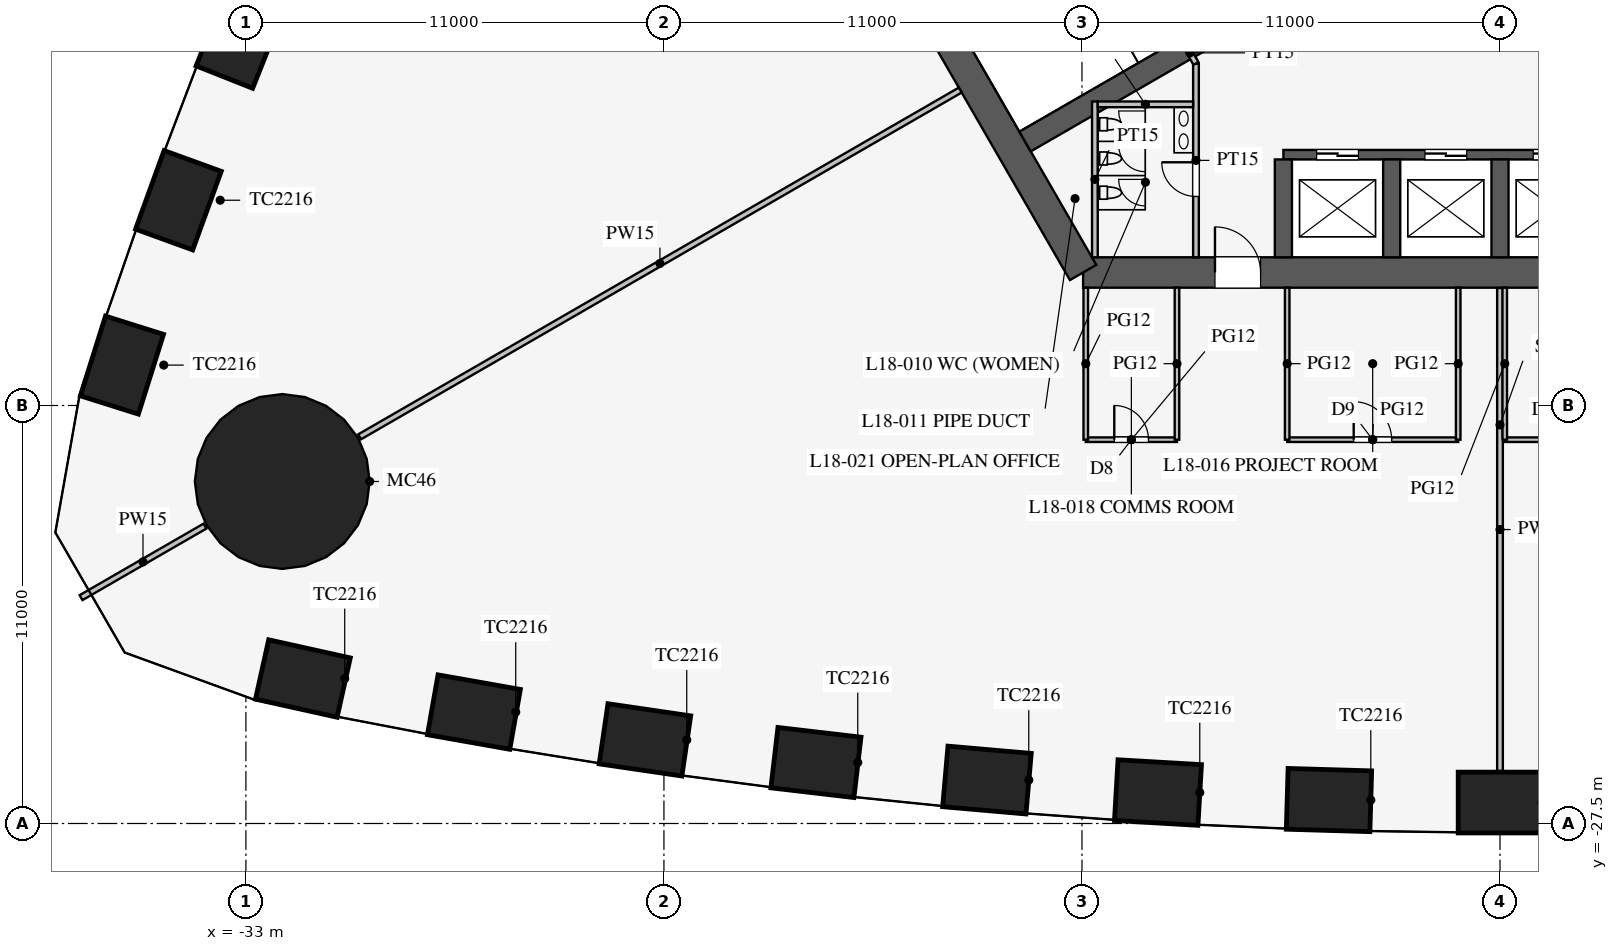
"""IFC4 building model, lengths in metres.
Left out: names, types, materials, properties, quantities, classifications, styles, units other than length and angle.
Written with IfcOpenShell. Run it as: python <this file> out.ifc"""

import sys

from ifc_helpers import new_model, si_unit, direction, frame, frame_2d, origin, origin_2d, place, context, subcontext, project, spatial, rectangle, circle, extrude, element, fill, save


model = new_model("IFC4")
c1 = context("Model", 3, precision=1e-05, world=origin(), true_north=direction((0.0, 1.0)))
c2 = subcontext(c1, "Body", "Model", "MODEL_VIEW")
j1 = project(units=[si_unit("LENGTHUNIT", "METRE"), si_unit("PLANEANGLEUNIT", "RADIAN")], contexts=[c1])
p1 = place(None, origin())
s1 = spatial("IfcSite", under=j1, at=p1, CompositionType="ELEMENT")
p2 = place(p1, origin())
s2 = spatial("IfcBuilding", under=s1, at=p2, CompositionType="ELEMENT")
p3 = place(p2, frame((0.0, 0.0, 79.5)))
s3 = spatial("IfcBuildingStorey", under=s2, at=p3, CompositionType="ELEMENT", Elevation=79.5)
for number, where, z_axis, x_axis in (
    (1, (-31.5, -23.685, 0.0), (0.0, 0.0, 1.0), (0.976, -0.217, 0.0)),
    (2, (-27.0, -24.568, 0.0), (0.0, 0.0, 1.0), (0.985, -0.174, 0.0)),
    (3, (-22.5, -25.299, 0.0), (0.0, 0.0, 1.0), (0.989, -0.145, 0.0)),
    (4, (-18.0, -25.895, 0.0), (0.0, 0.0, 1.0), (0.993, -0.116, 0.0)),
    (5, (-13.5, -26.357, 0.0), (0.0, 0.0, 1.0), (0.996, -0.087, 0.0)),
    (6, (-9.0, -26.686, 0.0), (0.0, 0.0, 1.0), (0.998, -0.058, 0.0)),
    (7, (-4.5, -26.883, 0.0), (0.0, 0.0, 1.0), (1.0, -0.029, 0.0)),
    (8, (0.0, -26.949, 0.0), (0.0, 0.0, 1.0), (1.0, 0.0, 0.0)),
    (9, (-33.16, -6.836, 0.0), (0.0, 0.0, 1.0), (-0.369, -0.929, 0.0)),
    (10, (-34.776, -11.099, 0.0), (0.0, 0.0, 1.0), (-0.342, -0.94, 0.0)),
    (11, (-36.262, -15.438, 0.0), (0.0, 0.0, 1.0), (-0.3, -0.954, 0.0)),
):
    element("IfcColumn", number, at=place(p3, frame(where, z_axis=z_axis, x_axis=x_axis)), inside=s3, PredefinedType="COLUMN", context=c2, shape_type="SweptSolid", body=[
        extrude(rectangle(XDim=2.2, YDim=1.6, at=origin_2d()), origin(), (0.0, 0.0, 1.0), 4.2),
    ])
p4 = place(p3, frame((-32.043, -18.5, 0.0), z_axis=(0.0, 0.0, 1.0), x_axis=(1.0, 0.0, 0.0)))
e12 = element("IfcColumn", 12, at=p4, inside=s3, PredefinedType="COLUMN", context=c2, shape_type="SweptSolid", body=[
    extrude(circle(Radius=2.3, at=origin_2d()), origin(), (0.0, 0.0, 1.0), 4.2),
])
p5 = place(p3, frame((-10.97, -13.0, 0.0), z_axis=(0.0, 0.0, 1.0), x_axis=(1.0, 0.0, 0.0)))
e13 = element("IfcWall", 13, at=p5, inside=s3, PredefinedType="SHEAR", context=c2, shape_type="SweptSolid", body=[
    extrude(rectangle(XDim=21.939, YDim=0.8, at=frame_2d((10.97, 0.0))), origin(), (0.0, 0.0, 1.0), 4.2),
])
p6 = place(p5, frame((17.27, 0.0, 0.0)))
e14 = element("IfcOpeningElement", 14, at=p6, cuts=e13, PredefinedType="OPENING", context=c2, shape_type="SweptSolid", body=[
    extrude(rectangle(XDim=1.2, YDim=2.1, at=frame_2d((0.6, 1.05))), frame((0.0, 0.41, 0.0), z_axis=(0.0, -1.0, 0.0), x_axis=(1.0, 0.0, 0.0)), (0.0, 0.0, 1.0), 0.82),
])
p7 = place(p5, frame((3.47, 0.0, 0.0)))
e15 = element("IfcOpeningElement", 15, at=p7, cuts=e13, PredefinedType="OPENING", context=c2, shape_type="SweptSolid", body=[
    extrude(rectangle(XDim=1.2, YDim=2.1, at=frame_2d((0.6, 1.05))), frame((0.0, 0.41, 0.0), z_axis=(0.0, -1.0, 0.0), x_axis=(1.0, 0.0, 0.0)), (0.0, 0.0, 1.0), 0.82),
])
p8 = place(p3, frame((-16.743, -3.0, 0.0), z_axis=(0.0, 0.0, 1.0), x_axis=(0.499995765644, -0.866027848477, 0.0)))
e16 = element("IfcWall", 16, at=p8, inside=s3, PredefinedType="SHEAR", context=c2, shape_type="SweptSolid", body=[
    extrude(rectangle(XDim=11.547, YDim=0.8, at=frame_2d((5.773, 0.0))), origin(), (0.0, 0.0, 1.0), 4.2),
])
p9 = place(p3, frame((-5.7, -9.9, 0.0), z_axis=(0.0, 0.0, 1.0), x_axis=(1.0, 0.0, 0.0)))
e17 = element("IfcWall", 17, at=p9, inside=s3, PredefinedType="SHEAR", context=c2, shape_type="SweptSolid", body=[
    extrude(rectangle(XDim=11.4, YDim=0.25, at=frame_2d((5.7, 0.0))), origin(), (0.0, 0.0, 1.0), 4.2),
])
p10 = place(p9, frame((0.875, 0.0, 0.0)))
e18 = element("IfcOpeningElement", 18, at=p10, cuts=e17, PredefinedType="OPENING", context=c2, shape_type="SweptSolid", body=[
    extrude(rectangle(XDim=1.1, YDim=2.2, at=frame_2d((0.55, 1.1))), frame((0.0, 0.135, 0.0), z_axis=(0.0, -1.0, 0.0), x_axis=(1.0, 0.0, 0.0)), (0.0, 0.0, 1.0), 0.27),
])
p11 = place(p9, frame((3.725, 0.0, 0.0)))
e19 = element("IfcOpeningElement", 19, at=p11, cuts=e17, PredefinedType="OPENING", context=c2, shape_type="SweptSolid", body=[
    extrude(rectangle(XDim=1.1, YDim=2.2, at=frame_2d((0.55, 1.1))), frame((0.0, 0.135, 0.0), z_axis=(0.0, -1.0, 0.0), x_axis=(1.0, 0.0, 0.0)), (0.0, 0.0, 1.0), 0.27),
])
p12 = place(p9, frame((6.575, 0.0, 0.0)))
e20 = element("IfcOpeningElement", 20, at=p12, cuts=e17, PredefinedType="OPENING", context=c2, shape_type="SweptSolid", body=[
    extrude(rectangle(XDim=1.1, YDim=2.2, at=frame_2d((0.55, 1.1))), frame((0.0, 0.135, 0.0), z_axis=(0.0, -1.0, 0.0), x_axis=(1.0, 0.0, 0.0)), (0.0, 0.0, 1.0), 0.27),
])
p13 = place(p9, frame((9.425, 0.0, 0.0)))
e21 = element("IfcOpeningElement", 21, at=p13, cuts=e17, PredefinedType="OPENING", context=c2, shape_type="SweptSolid", body=[
    extrude(rectangle(XDim=1.1, YDim=2.2, at=frame_2d((0.55, 1.1))), frame((0.0, 0.135, 0.0), z_axis=(0.0, -1.0, 0.0), x_axis=(1.0, 0.0, 0.0)), (0.0, 0.0, 1.0), 0.27),
])
for number, where, z_axis, x_axis in (
    (22, (-5.7, -10.025, 0.0), (0.0, 0.0, 1.0), (0.0, -1.0, 0.0)),
    (23, (-2.85, -10.025, 0.0), (0.0, 0.0, 1.0), (0.0, -1.0, 0.0)),
    (24, (0.0, -10.025, 0.0), (0.0, 0.0, 1.0), (0.0, -1.0, 0.0)),
):
    element("IfcWall", number, at=place(p3, frame(where, z_axis=z_axis, x_axis=x_axis)), inside=s3, PredefinedType="SHEAR", context=c2, shape_type="SweptSolid", body=[
        extrude(rectangle(XDim=2.575, YDim=0.45, at=frame_2d((1.288, 0.0))), origin(), (0.0, 0.0, 1.0), 4.2),
    ])
p14 = place(p3, frame((-4.638, -5.016, 0.0), z_axis=(0.0, 0.0, 1.0), x_axis=(-0.866019375473, -0.500010441196, 0.0)))
e25 = element("IfcWall", 25, at=p14, inside=s3, PredefinedType="SHEAR", context=c2, shape_type="SweptSolid", body=[
    extrude(rectangle(XDim=9.075, YDim=0.6, at=frame_2d((4.538, 0.0))), origin(), (0.0, 0.0, 1.0), 4.2),
])
p15 = place(p3, frame((-8.0, -7.5, 0.0), z_axis=(0.0, 0.0, 1.0), x_axis=(0.0, -1.0, 0.0)))
e26 = element("IfcWall", 26, at=p15, inside=s3, PredefinedType="PARTITIONING", context=c2, shape_type="SweptSolid", body=[
    extrude(rectangle(XDim=5.1, YDim=0.15, at=frame_2d((2.55, 0.0))), origin(), (0.0, 0.0, 1.0), 4.0),
])
p16 = place(p15, frame((2.6, 0.0, 0.0)))
e27 = element("IfcOpeningElement", 27, at=p16, cuts=e26, PredefinedType="OPENING", context=c2, shape_type="SweptSolid", body=[
    extrude(rectangle(XDim=0.9, YDim=2.1, at=frame_2d((0.45, 1.05))), frame((0.0, 0.085, 0.0), z_axis=(0.0, -1.0, 0.0), x_axis=(1.0, 0.0, 0.0)), (0.0, 0.0, 1.0), 0.17),
])
p17 = place(p3, frame((-8.0, -7.5, 0.0), z_axis=(0.0, 0.0, 1.0), x_axis=(-0.499842556608, 0.866116284689, 0.0)))
e28 = element("IfcWall", 28, at=p17, inside=s3, PredefinedType="PARTITIONING", context=c2, shape_type="SweptSolid", body=[
    extrude(rectangle(XDim=0.645, YDim=0.15, at=frame_2d((0.323, 0.0))), origin(), (0.0, 0.0, 1.0), 4.0),
])
p18 = place(p3, frame((-10.66, -8.5, 0.0), z_axis=(0.0, 0.0, 1.0), x_axis=(0.0, -1.0, 0.0)))
e29 = element("IfcWall", 29, at=p18, inside=s3, PredefinedType="PARTITIONING", context=c2, shape_type="SweptSolid", body=[
    extrude(rectangle(XDim=4.1, YDim=0.15, at=frame_2d((2.05, 0.0))), origin(), (0.0, 0.0, 1.0), 4.0),
])
p19 = place(p3, frame((-8.075, -8.575, 0.0), z_axis=(0.0, 0.0, 1.0), x_axis=(-1.0, 0.0, 0.0)))
e30 = element("IfcWall", 30, at=p19, inside=s3, PredefinedType="PARTITIONING", context=c2, shape_type="SweptSolid", body=[
    extrude(rectangle(XDim=2.51, YDim=0.15, at=frame_2d((1.255, 0.0))), origin(), (0.0, 0.0, 1.0), 4.0),
])
p20 = place(p3, frame((-14.203, -8.2, 0.0), z_axis=(0.0, 0.0, 1.0), x_axis=(-0.866024965723, -0.500000758745, 0.0)))
e31 = element("IfcWall", 31, at=p20, inside=s3, PredefinedType="PARTITIONING", context=c2, shape_type="SweptSolid", body=[
    extrude(rectangle(XDim=18.25, YDim=0.15, at=frame_2d((9.125, 0.0))), origin(), (0.0, 0.0, 1.0), 2.3),
])
p21 = place(p3, frame((-34.078, -19.675, 0.0), z_axis=(0.0, 0.0, 1.0), x_axis=(-0.866019247219, -0.500010663332, 0.0)))
e32 = element("IfcWall", 32, at=p21, inside=s3, PredefinedType="PARTITIONING", context=c2, shape_type="SweptSolid", body=[
    extrude(rectangle(XDim=3.764, YDim=0.15, at=frame_2d((1.882, 0.0))), origin(), (0.0, 0.0, 1.0), 2.3),
])
p22 = place(p3, frame((0.0, -13.41, 0.0), z_axis=(0.0, 0.0, 1.0), x_axis=(0.0, -1.0, 0.0)))
e33 = element("IfcWall", 33, at=p22, inside=s3, PredefinedType="PARTITIONING", context=c2, shape_type="SweptSolid", body=[
    extrude(rectangle(XDim=12.709, YDim=0.15, at=frame_2d((6.354, 0.0))), origin(), (0.0, 0.0, 1.0), 2.8),
])
p23 = place(p3, frame((0.125, -17.4, 0.0), z_axis=(0.0, 0.0, 1.0), x_axis=(1.0, 0.0, 0.0)))
e34 = element("IfcWall", 34, at=p23, inside=s3, PredefinedType="PARTITIONING", context=c2, shape_type="SweptSolid", body=[
    extrude(rectangle(XDim=3.6, YDim=0.12, at=frame_2d((1.8, 0.0))), origin(), (0.0, 0.0, 1.0), 2.9),
])
p24 = place(p23, frame((1.3, 0.0, 0.15)))
e35 = element("IfcOpeningElement", 35, at=p24, cuts=e34, PredefinedType="OPENING", context=c2, shape_type="SweptSolid", body=[
    extrude(rectangle(XDim=1.0, YDim=2.1, at=frame_2d((0.5, 1.05))), frame((0.0, 0.07, 0.0), z_axis=(0.0, -1.0, 0.0), x_axis=(1.0, 0.0, 0.0)), (0.0, 0.0, 1.0), 0.14),
])
p25 = place(p3, frame((-10.9, -17.4, 0.0), z_axis=(0.0, 0.0, 1.0), x_axis=(1.0, 0.0, 0.0)))
e36 = element("IfcWall", 36, at=p25, inside=s3, PredefinedType="PARTITIONING", context=c2, shape_type="SweptSolid", body=[
    extrude(rectangle(XDim=2.4, YDim=0.12, at=frame_2d((1.2, 0.0))), origin(), (0.0, 0.0, 1.0), 2.9),
])
p26 = place(p25, frame((0.75, 0.0, 0.15)))
e37 = element("IfcOpeningElement", 37, at=p26, cuts=e36, PredefinedType="OPENING", context=c2, shape_type="SweptSolid", body=[
    extrude(rectangle(XDim=0.9, YDim=2.1, at=frame_2d((0.45, 1.05))), frame((0.0, 0.07, 0.0), z_axis=(0.0, -1.0, 0.0), x_axis=(1.0, 0.0, 0.0)), (0.0, 0.0, 1.0), 0.14),
])
p27 = place(p3, frame((-5.6, -17.4, 0.0), z_axis=(0.0, 0.0, 1.0), x_axis=(1.0, 0.0, 0.0)))
e38 = element("IfcWall", 38, at=p27, inside=s3, PredefinedType="PARTITIONING", context=c2, shape_type="SweptSolid", body=[
    extrude(rectangle(XDim=4.5, YDim=0.12, at=frame_2d((2.25, 0.0))), origin(), (0.0, 0.0, 1.0), 2.9),
])
p28 = place(p27, frame((1.75, 0.0, 0.15)))
e39 = element("IfcOpeningElement", 39, at=p28, cuts=e38, PredefinedType="OPENING", context=c2, shape_type="SweptSolid", body=[
    extrude(rectangle(XDim=1.0, YDim=2.1, at=frame_2d((0.5, 1.05))), frame((0.0, 0.07, 0.0), z_axis=(0.0, -1.0, 0.0), x_axis=(1.0, 0.0, 0.0)), (0.0, 0.0, 1.0), 0.14),
])
p29 = place(p3, frame((0.125, -13.4, 0.0), z_axis=(0.0, 0.0, 1.0), x_axis=(0.0, -1.0, 0.0)))
e40 = element("IfcWall", 40, at=p29, inside=s3, PredefinedType="PARTITIONING", context=c2, shape_type="SweptSolid", body=[
    extrude(rectangle(XDim=4.0, YDim=0.12, at=frame_2d((2.0, 0.0))), origin(), (0.0, 0.0, 1.0), 2.8),
])
for number, where, z_axis, x_axis in (
    (41, (-1.1, -13.4, 0.0), (0.0, 0.0, 1.0), (0.0, -1.0, 0.0)),
    (42, (-10.9, -13.4, 0.0), (0.0, 0.0, 1.0), (0.0, -1.0, 0.0)),
    (43, (-5.6, -13.4, 0.0), (0.0, 0.0, 1.0), (0.0, -1.0, 0.0)),
    (44, (-8.5, -13.4, 0.0), (0.0, 0.0, 1.0), (0.0, -1.0, 0.0)),
):
    element("IfcWall", number, at=place(p3, frame(where, z_axis=z_axis, x_axis=x_axis)), inside=s3, PredefinedType="PARTITIONING", context=c2, shape_type="SweptSolid", body=[
        extrude(rectangle(XDim=4.0, YDim=0.12, at=frame_2d((2.0, 0.0))), origin(), (0.0, 0.0, 1.0), 2.9),
    ])
p30 = place(p16, frame((0.9, 0.0, 0.0), z_axis=(0.0, 0.0, 1.0), x_axis=(-1.0, 0.0, 0.0)))
e45 = element("IfcDoor", 45, at=p30, inside=s3, OperationType="SINGLE_SWING_RIGHT", PredefinedType="DOOR", context=c2, shape_type="SweptSolid", body=[
    extrude(rectangle(XDim=0.9, YDim=2.1, at=frame_2d((0.45, 1.05))), frame((0.0, 0.025, 0.0), z_axis=(0.0, -1.0, 0.0), x_axis=(1.0, 0.0, 0.0)), (0.0, 0.0, 1.0), 0.05),
])
fill(e27, e45)
p31 = place(p7, origin())
e46 = element("IfcDoor", 46, at=p31, inside=s3, OperationType="SINGLE_SWING_LEFT", PredefinedType="DOOR", context=c2, shape_type="SweptSolid", body=[
    extrude(rectangle(XDim=1.2, YDim=2.1, at=frame_2d((0.6, 1.05))), frame((0.0, 0.025, 0.0), z_axis=(0.0, -1.0, 0.0), x_axis=(1.0, 0.0, 0.0)), (0.0, 0.0, 1.0), 0.05),
])
fill(e15, e46)
p32 = place(p28, origin())
e47 = element("IfcDoor", 47, at=p32, inside=s3, OperationType="SINGLE_SWING_LEFT", PredefinedType="DOOR", context=c2, shape_type="SweptSolid", body=[
    extrude(rectangle(XDim=1.0, YDim=2.1, at=frame_2d((0.5, 1.05))), frame((0.0, 0.025, 0.0), z_axis=(0.0, -1.0, 0.0), x_axis=(1.0, 0.0, 0.0)), (0.0, 0.0, 1.0), 0.05),
])
fill(e39, e47)
p33 = place(p26, origin())
e48 = element("IfcDoor", 48, at=p33, inside=s3, OperationType="SINGLE_SWING_LEFT", PredefinedType="DOOR", context=c2, shape_type="SweptSolid", body=[
    extrude(rectangle(XDim=0.9, YDim=2.1, at=frame_2d((0.45, 1.05))), frame((0.0, 0.025, 0.0), z_axis=(0.0, -1.0, 0.0), x_axis=(1.0, 0.0, 0.0)), (0.0, 0.0, 1.0), 0.05),
])
fill(e37, e48)
p34 = place(p10, origin())
e49 = element("IfcDoor", 49, at=p34, inside=s3, OperationType="DOUBLE_DOOR_SLIDING", PredefinedType="DOOR", context=c2, shape_type="SweptSolid", body=[
    extrude(rectangle(XDim=1.1, YDim=2.2, at=frame_2d((0.55, 1.1))), frame((0.0, 0.025, 0.0), z_axis=(0.0, -1.0, 0.0), x_axis=(1.0, 0.0, 0.0)), (0.0, 0.0, 1.0), 0.05),
])
fill(e18, e49)
p35 = place(p11, origin())
e50 = element("IfcDoor", 50, at=p35, inside=s3, OperationType="DOUBLE_DOOR_SLIDING", PredefinedType="DOOR", context=c2, shape_type="SweptSolid", body=[
    extrude(rectangle(XDim=1.1, YDim=2.2, at=frame_2d((0.55, 1.1))), frame((0.0, 0.025, 0.0), z_axis=(0.0, -1.0, 0.0), x_axis=(1.0, 0.0, 0.0)), (0.0, 0.0, 1.0), 0.05),
])
fill(e19, e50)
p36 = place(p12, origin())
e51 = element("IfcDoor", 51, at=p36, inside=s3, OperationType="DOUBLE_DOOR_SLIDING", PredefinedType="DOOR", context=c2, shape_type="SweptSolid", body=[
    extrude(rectangle(XDim=1.1, YDim=2.2, at=frame_2d((0.55, 1.1))), frame((0.0, 0.025, 0.0), z_axis=(0.0, -1.0, 0.0), x_axis=(1.0, 0.0, 0.0)), (0.0, 0.0, 1.0), 0.05),
])
fill(e20, e51)
save(model, sys.argv[1])
